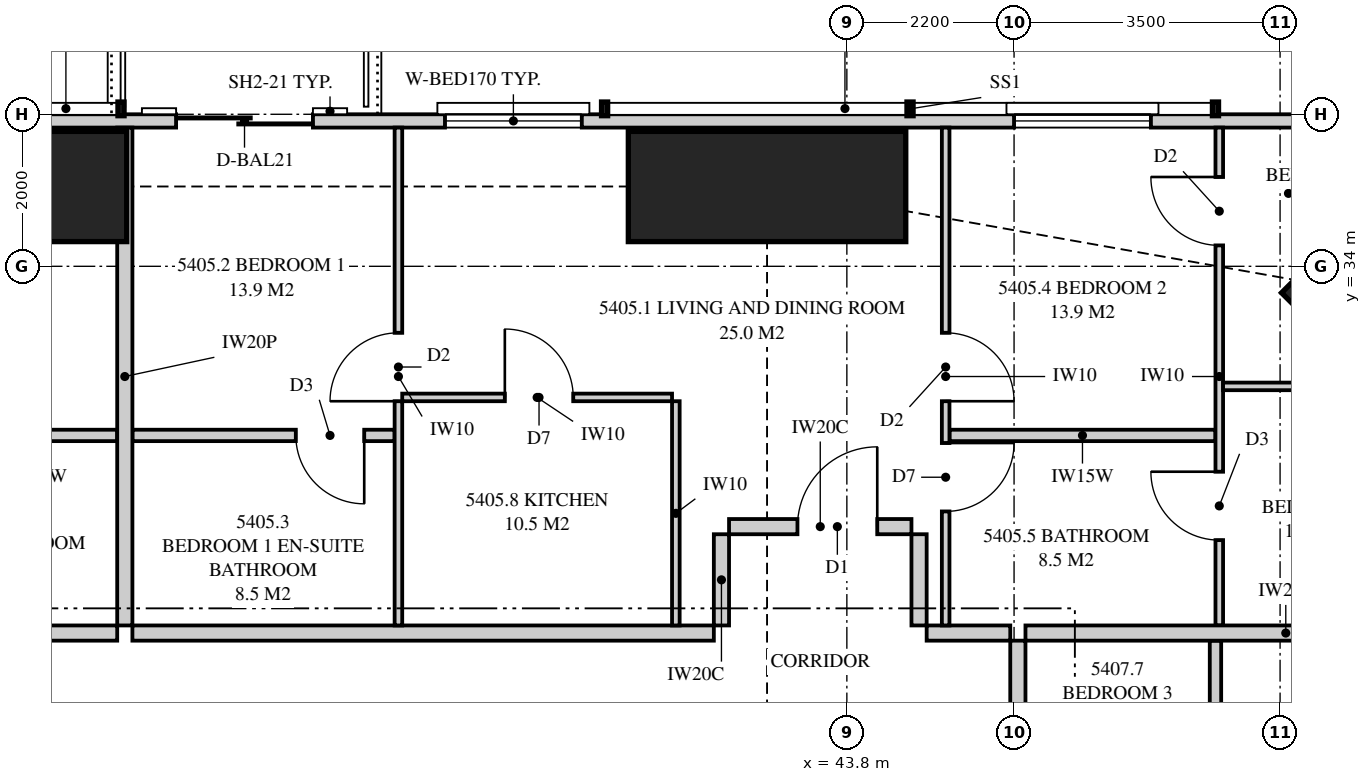
"""IFC4 building model, lengths in metres.
Left out: names, types, materials, properties, quantities, classifications, styles, units other than length and angle.
Written with IfcOpenShell. Run it as: python <this file> out.ifc"""

import sys

from ifc_helpers import new_model, si_unit, direction, frame, frame_2d, origin, origin_2d, place, context, subcontext, project, spatial, polyline, rectangle, outline, extrude, element, fill, save


model = new_model("IFC4")
c1 = context("Model", 3, precision=1e-05, world=origin(), true_north=direction((0.0, 1.0)))
c2 = subcontext(c1, "Body", "Model", "MODEL_VIEW")
j1 = project(units=[si_unit("LENGTHUNIT", "METRE"), si_unit("PLANEANGLEUNIT", "RADIAN")], contexts=[c1])
p1 = place(None, origin())
s1 = spatial("IfcSite", under=j1, at=p1, CompositionType="ELEMENT")
p2 = place(p1, origin())
s2 = spatial("IfcBuilding", under=s1, at=p2, CompositionType="ELEMENT")
p3 = place(p2, frame((0.0, 0.0, 197.9)))
s3 = spatial("IfcBuildingStorey", under=s2, at=p3, CompositionType="ELEMENT", Elevation=197.9)
p4 = place(p3, frame((50.652, 33.652, 0.0), z_axis=(0.0, 0.0, 1.0), x_axis=(0.707106781187, 0.707106781187, 0.0)))
e1 = element("IfcColumn", 1, at=p4, inside=s3, PredefinedType="COLUMN", context=c2, shape_type="SweptSolid", body=[
    extrude(rectangle(XDim=1.6, YDim=1.6, at=origin_2d()), origin(), (0.0, 0.0, 1.0), 3.35),
])
for number, where, z_axis, x_axis in (
    (2, (42.75, 35.05, 0.0), (0.0, 0.0, 1.0), (0.0, 1.0, 0.0)),
    (3, (32.5, 35.05, 0.0), (0.0, 0.0, 1.0), (0.0, 1.0, 0.0)),
):
    element("IfcColumn", number, at=place(p3, frame(where, z_axis=z_axis, x_axis=x_axis)), inside=s3, PredefinedType="COLUMN", context=c2, shape_type="SweptSolid", body=[
        extrude(rectangle(XDim=1.45, YDim=3.65, at=origin_2d()), origin(), (0.0, 0.0, 1.0), 3.35),
    ])
p5 = place(p3, frame((49.949, 35.913, 0.0), z_axis=(0.0, 0.0, 1.0), x_axis=(-1.0, 0.0, 0.0)))
e4 = element("IfcWall", 4, at=p5, inside=s3, PredefinedType="SOLIDWALL", context=c2, shape_type="SweptSolid", body=[
    extrude(outline(polyline([(0.0, 0.0), (34.897, 0.0), (34.897, 3.11), (27.91, 3.11), (27.91, 2.15), (27.836, 2.15), (27.836, 3.11), (27.699, 3.11), (27.699, 2.15), (7.199, 2.15), (7.199, 3.11), (7.062, 3.11), (7.062, 2.15), (6.987, 2.15), (6.987, 3.11), (0.0, 3.11), (0.0, 0.0)])), frame((0.0, 0.087, 0.0), z_axis=(0.0, -1.0, 0.0), x_axis=(1.0, 0.0, 0.0)), (0.0, 0.0, 1.0), 0.175),
])
p6 = place(p5, frame((2.149, 0.0, 0.4)))
e5 = element("IfcOpeningElement", 5, at=p6, cuts=e4, PredefinedType="OPENING", context=c2, shape_type="SweptSolid", body=[
    extrude(rectangle(XDim=1.8, YDim=1.7, at=frame_2d((0.9, 0.85))), frame((0.0, 0.097, 0.0), z_axis=(0.0, -1.0, 0.0), x_axis=(1.0, 0.0, 0.0)), (0.0, 0.0, 1.0), 0.195),
])
p7 = place(p5, frame((9.636, 0.0, 0.4)))
e6 = element("IfcOpeningElement", 6, at=p7, cuts=e4, PredefinedType="OPENING", context=c2, shape_type="SweptSolid", body=[
    extrude(rectangle(XDim=1.8, YDim=1.7, at=frame_2d((0.9, 0.85))), frame((0.0, 0.097, 0.0), z_axis=(0.0, -1.0, 0.0), x_axis=(1.0, 0.0, 0.0)), (0.0, 0.0, 1.0), 0.195),
])
p8 = place(p5, frame((13.174, 0.0, 0.0)))
e7 = element("IfcOpeningElement", 7, at=p8, cuts=e4, PredefinedType="OPENING", context=c2, shape_type="SweptSolid", body=[
    extrude(rectangle(XDim=1.8, YDim=2.1, at=frame_2d((0.9, 1.05))), frame((0.0, 0.097, 0.0), z_axis=(0.0, -1.0, 0.0), x_axis=(1.0, 0.0, 0.0)), (0.0, 0.0, 1.0), 0.195),
])
p9 = place(p5, frame((19.374, 0.0, 0.4)))
e8 = element("IfcOpeningElement", 8, at=p9, cuts=e4, PredefinedType="OPENING", context=c2, shape_type="SweptSolid", body=[
    extrude(rectangle(XDim=1.8, YDim=1.7, at=frame_2d((0.9, 0.85))), frame((0.0, 0.097, 0.0), z_axis=(0.0, -1.0, 0.0), x_axis=(1.0, 0.0, 0.0)), (0.0, 0.0, 1.0), 0.195),
])
p10 = place(p5, frame((23.224, 0.0, 0.4)))
e9 = element("IfcOpeningElement", 9, at=p10, cuts=e4, PredefinedType="OPENING", context=c2, shape_type="SweptSolid", body=[
    extrude(rectangle(XDim=2.4, YDim=1.7, at=frame_2d((1.2, 0.85))), frame((0.0, 0.097, 0.0), z_axis=(0.0, -1.0, 0.0), x_axis=(1.0, 0.0, 0.0)), (0.0, 0.0, 1.0), 0.195),
])
p11 = place(p5, frame((32.399, 0.0, 0.4)))
e10 = element("IfcOpeningElement", 10, at=p11, cuts=e4, PredefinedType="OPENING", context=c2, shape_type="SweptSolid", body=[
    extrude(rectangle(XDim=1.8, YDim=1.7, at=frame_2d((0.9, 0.85))), frame((0.0, 0.097, 0.0), z_axis=(0.0, -1.0, 0.0), x_axis=(1.0, 0.0, 0.0)), (0.0, 0.0, 1.0), 0.195),
])
p12 = place(p3, frame((34.3, 35.825, 0.0), z_axis=(0.0, 0.0, 1.0), x_axis=(0.0, -1.0, 0.0)))
e11 = element("IfcWall", 11, at=p12, inside=s3, PredefinedType="PARTITIONING", context=c2, shape_type="SweptSolid", body=[
    extrude(outline(polyline([(0.0, 0.0), (6.55, 0.0), (6.55, 3.11), (1.685, 3.11), (1.685, 2.15), (0.0, 2.15), (0.0, 3.11), (0.0, 0.0)])), frame((0.0, 0.1, 0.0), z_axis=(0.0, -1.0, 0.0), x_axis=(1.0, 0.0, 0.0)), (0.0, 0.0, 1.0), 0.2),
])
p13 = place(p3, frame((28.4, 31.775, 0.0), z_axis=(0.0, 0.0, 1.0), x_axis=(1.0, 0.0, 0.0)))
e12 = element("IfcWall", 12, at=p13, inside=s3, PredefinedType="PLUMBINGWALL", context=c2, shape_type="SweptSolid", body=[
    extrude(outline(polyline([(0.0, 0.0), (5.8, 0.0), (5.8, 3.11), (4.412, 3.11), (4.412, 2.541), (3.788, 2.541), (3.788, 3.11), (0.0, 3.11), (0.0, 0.0)])), frame((0.0, 0.075, 0.0), z_axis=(0.0, -1.0, 0.0), x_axis=(1.0, 0.0, 0.0)), (0.0, 0.0, 1.0), 0.15),
])
p14 = place(p13, frame((0.4, 0.0, 0.0)))
e13 = element("IfcOpeningElement", 13, at=p14, cuts=e12, PredefinedType="OPENING", context=c2, shape_type="SweptSolid", body=[
    extrude(rectangle(XDim=0.9, YDim=2.1, at=frame_2d((0.45, 1.05))), frame((0.0, 0.085, 0.0), z_axis=(0.0, -1.0, 0.0), x_axis=(1.0, 0.0, 0.0)), (0.0, 0.0, 1.0), 0.17),
])
p15 = place(p3, frame((34.4, 29.175, 0.0), z_axis=(0.0, 0.0, 1.0), x_axis=(1.0, 0.0, 0.0)))
e14 = element("IfcWall", 14, at=p15, inside=s3, PredefinedType="PARTITIONING", context=c2, shape_type="SweptSolid", body=[
    extrude(rectangle(XDim=7.65, YDim=0.2, at=frame_2d((3.825, 0.0))), origin(), (0.0, 0.0, 1.0), 3.11),
])
p16 = place(p3, frame((37.9, 35.825, 0.0), z_axis=(0.0, 0.0, 1.0), x_axis=(0.0, -1.0, 0.0)))
e15 = element("IfcWall", 15, at=p16, inside=s3, PredefinedType="PARTITIONING", context=c2, shape_type="SweptSolid", body=[
    extrude(outline(polyline([(0.0, 0.0), (6.55, 0.0), (6.55, 3.11), (1.635, 3.11), (1.635, 2.15), (0.0, 2.15), (0.0, 3.11), (0.0, 0.0)])), frame((0.0, 0.05, 0.0), z_axis=(0.0, -1.0, 0.0), x_axis=(1.0, 0.0, 0.0)), (0.0, 0.0, 1.0), 0.1),
])
p17 = place(p16, frame((2.7, 0.0, 0.0)))
e16 = element("IfcOpeningElement", 16, at=p17, cuts=e15, PredefinedType="OPENING", context=c2, shape_type="SweptSolid", body=[
    extrude(rectangle(XDim=0.9, YDim=2.1, at=frame_2d((0.45, 1.05))), frame((0.0, 0.06, 0.0), z_axis=(0.0, -1.0, 0.0), x_axis=(1.0, 0.0, 0.0)), (0.0, 0.0, 1.0), 0.12),
])
p18 = place(p3, frame((45.1, 35.825, 0.0), z_axis=(0.0, 0.0, 1.0), x_axis=(0.0, -1.0, 0.0)))
e17 = element("IfcWall", 17, at=p18, inside=s3, PredefinedType="PARTITIONING", context=c2, shape_type="SweptSolid", body=[
    extrude(outline(polyline([(0.0, 0.0), (6.55, 0.0), (6.55, 3.11), (2.064, 3.11), (2.064, 2.15), (0.318, 2.15), (0.318, 3.11), (0.0, 3.11), (0.0, 0.0)])), frame((0.0, 0.05, 0.0), z_axis=(0.0, -1.0, 0.0), x_axis=(1.0, 0.0, 0.0)), (0.0, 0.0, 1.0), 0.1),
])
p19 = place(p18, frame((2.7, 0.0, 0.0)))
e18 = element("IfcOpeningElement", 18, at=p19, cuts=e17, PredefinedType="OPENING", context=c2, shape_type="SweptSolid", body=[
    extrude(rectangle(XDim=0.9, YDim=2.1, at=frame_2d((0.45, 1.05))), frame((0.0, 0.06, 0.0), z_axis=(0.0, -1.0, 0.0), x_axis=(1.0, 0.0, 0.0)), (0.0, 0.0, 1.0), 0.12),
])
p20 = place(p18, frame((4.15, 0.0, 0.0)))
e19 = element("IfcOpeningElement", 19, at=p20, cuts=e17, PredefinedType="OPENING", context=c2, shape_type="SweptSolid", body=[
    extrude(rectangle(XDim=0.9, YDim=2.1, at=frame_2d((0.45, 1.05))), frame((0.0, 0.06, 0.0), z_axis=(0.0, -1.0, 0.0), x_axis=(1.0, 0.0, 0.0)), (0.0, 0.0, 1.0), 0.12),
])
p21 = place(p3, frame((48.7, 35.825, 0.0), z_axis=(0.0, 0.0, 1.0), x_axis=(0.0, -1.0, 0.0)))
e20 = element("IfcWall", 20, at=p21, inside=s3, PredefinedType="PARTITIONING", context=c2, shape_type="SweptSolid", body=[
    extrude(outline(polyline([(0.0, 0.0), (6.55, 0.0), (6.55, 3.11), (2.701, 3.11), (2.701, 2.15), (0.955, 2.15), (0.955, 3.11), (0.0, 3.11), (0.0, 0.0)])), frame((0.0, 0.05, 0.0), z_axis=(0.0, -1.0, 0.0), x_axis=(1.0, 0.0, 0.0)), (0.0, 0.0, 1.0), 0.1),
])
p22 = place(p21, frame((0.65, 0.0, 0.0)))
e21 = element("IfcOpeningElement", 21, at=p22, cuts=e20, PredefinedType="OPENING", context=c2, shape_type="SweptSolid", body=[
    extrude(rectangle(XDim=0.9, YDim=2.1, at=frame_2d((0.45, 1.05))), frame((0.0, 0.06, 0.0), z_axis=(0.0, -1.0, 0.0), x_axis=(1.0, 0.0, 0.0)), (0.0, 0.0, 1.0), 0.12),
])
p23 = place(p21, frame((4.527, 0.0, 0.0)))
e22 = element("IfcOpeningElement", 22, at=p23, cuts=e20, PredefinedType="OPENING", context=c2, shape_type="SweptSolid", body=[
    extrude(rectangle(XDim=0.9, YDim=2.1, at=frame_2d((0.45, 1.05))), frame((0.0, 0.06, 0.0), z_axis=(0.0, -1.0, 0.0), x_axis=(1.0, 0.0, 0.0)), (0.0, 0.0, 1.0), 0.12),
])
p24 = place(p3, frame((34.4, 31.775, 0.0), z_axis=(0.0, 0.0, 1.0), x_axis=(1.0, 0.0, 0.0)))
e23 = element("IfcWall", 23, at=p24, inside=s3, PredefinedType="PLUMBINGWALL", context=c2, shape_type="SweptSolid", body=[
    extrude(rectangle(XDim=3.45, YDim=0.15, at=frame_2d((1.725, 0.0))), origin(), (0.0, 0.0, 1.0), 3.11),
])
p25 = place(p24, frame((2.15, 0.0, 0.0)))
e24 = element("IfcOpeningElement", 24, at=p25, cuts=e23, PredefinedType="OPENING", context=c2, shape_type="SweptSolid", body=[
    extrude(rectangle(XDim=0.9, YDim=2.1, at=frame_2d((0.45, 1.05))), frame((0.0, 0.085, 0.0), z_axis=(0.0, -1.0, 0.0), x_axis=(1.0, 0.0, 0.0)), (0.0, 0.0, 1.0), 0.17),
])
p26 = place(p3, frame((45.15, 31.775, 0.0), z_axis=(0.0, 0.0, 1.0), x_axis=(1.0, 0.0, 0.0)))
e25 = element("IfcWall", 25, at=p26, inside=s3, PredefinedType="PLUMBINGWALL", context=c2, shape_type="SweptSolid", body=[
    extrude(rectangle(XDim=3.5, YDim=0.15, at=frame_2d((1.75, 0.0))), origin(), (0.0, 0.0, 1.0), 3.11),
])
p27 = place(p3, frame((48.75, 32.42, 0.0), z_axis=(0.0, 0.0, 1.0), x_axis=(1.0, 0.0, 0.0)))
e26 = element("IfcWall", 26, at=p27, inside=s3, PredefinedType="PARTITIONING", context=c2, shape_type="SweptSolid", body=[
    extrude(outline(polyline([(0.0, 0.0), (4.25, 0.0), (4.25, 3.11), (2.972, 3.11), (2.972, 2.15), (1.229, 2.15), (1.229, 3.11), (0.0, 3.11), (0.0, 0.0)])), frame((0.0, 0.05, 0.0), z_axis=(0.0, -1.0, 0.0), x_axis=(1.0, 0.0, 0.0)), (0.0, 0.0, 1.0), 0.1),
])
p28 = place(p27, frame((2.9, 0.0, 0.0)))
e27 = element("IfcOpeningElement", 27, at=p28, cuts=e26, PredefinedType="OPENING", context=c2, shape_type="SweptSolid", body=[
    extrude(rectangle(XDim=0.9, YDim=2.1, at=frame_2d((0.45, 1.05))), frame((0.0, 0.06, 0.0), z_axis=(0.0, -1.0, 0.0), x_axis=(1.0, 0.0, 0.0)), (0.0, 0.0, 1.0), 0.12),
])
p29 = place(p3, frame((37.95, 32.275, 0.0), z_axis=(0.0, 0.0, 1.0), x_axis=(1.0, 0.0, 0.0)))
e28 = element("IfcWall", 28, at=p29, inside=s3, PredefinedType="PARTITIONING", context=c2, shape_type="SweptSolid", body=[
    extrude(rectangle(XDim=3.55, YDim=0.1, at=frame_2d((1.775, 0.0))), origin(), (0.0, 0.0, 1.0), 3.11),
])
p30 = place(p29, frame((1.35, 0.0, 0.0)))
e29 = element("IfcOpeningElement", 29, at=p30, cuts=e28, PredefinedType="OPENING", context=c2, shape_type="SweptSolid", body=[
    extrude(rectangle(XDim=0.9, YDim=2.1, at=frame_2d((0.45, 1.05))), frame((0.0, 0.06, 0.0), z_axis=(0.0, -1.0, 0.0), x_axis=(1.0, 0.0, 0.0)), (0.0, 0.0, 1.0), 0.12),
])
p31 = place(p3, frame((41.55, 32.225, 0.0), z_axis=(0.0, 0.0, 1.0), x_axis=(0.0, -1.0, 0.0)))
e30 = element("IfcWall", 30, at=p31, inside=s3, PredefinedType="PARTITIONING", context=c2, shape_type="SweptSolid", body=[
    extrude(rectangle(XDim=2.95, YDim=0.1, at=frame_2d((1.475, 0.0))), origin(), (0.0, 0.0, 1.0), 3.11),
])
p32 = place(p3, frame((46.15, 29.175, 0.0), z_axis=(0.0, 0.0, 1.0), x_axis=(1.0, 0.0, 0.0)))
e31 = element("IfcWall", 31, at=p32, inside=s3, PredefinedType="PARTITIONING", context=c2, shape_type="SweptSolid", body=[
    extrude(outline(polyline([(0.0, 0.0), (6.85, 0.0), (6.85, 3.11), (6.147, 3.11), (6.147, 2.15), (4.303, 2.15), (4.303, 3.11), (0.0, 3.11), (0.0, 0.0)])), frame((0.0, 0.1, 0.0), z_axis=(0.0, -1.0, 0.0), x_axis=(1.0, 0.0, 0.0)), (0.0, 0.0, 1.0), 0.2),
])
p33 = place(p3, frame((46.05, 7.925, 0.0), z_axis=(0.0, 0.0, 1.0), x_axis=(0.0, 1.0, 0.0)))
e32 = element("IfcWall", 32, at=p33, inside=s3, PredefinedType="PARTITIONING", context=c2, shape_type="SweptSolid", body=[
    extrude(outline(polyline([(0.0, 0.0), (21.15, 0.0), (21.15, 3.11), (17.412, 3.11), (17.412, 2.541), (16.738, 2.541), (16.738, 3.11), (5.412, 3.11), (5.412, 2.541), (4.738, 2.541), (4.738, 3.11), (0.0, 3.11), (0.0, 0.0)])), frame((0.0, 0.1, 0.0), z_axis=(0.0, -1.0, 0.0), x_axis=(1.0, 0.0, 0.0)), (0.0, 0.0, 1.0), 0.2),
])
p34 = place(p33, frame((10.075, 0.0, 0.0)))
e33 = element("IfcOpeningElement", 33, at=p34, cuts=e32, PredefinedType="OPENING", context=c2, shape_type="SweptSolid", body=[
    extrude(rectangle(XDim=1.05, YDim=2.2, at=frame_2d((0.525, 1.1))), frame((0.0, 0.11, 0.0), z_axis=(0.0, -1.0, 0.0), x_axis=(1.0, 0.0, 0.0)), (0.0, 0.0, 1.0), 0.22),
])
p35 = place(p3, frame((48.65, 25.875, 0.0), z_axis=(0.0, 0.0, 1.0), x_axis=(0.0, 1.0, 0.0)))
e34 = element("IfcWall", 34, at=p35, inside=s3, PredefinedType="PLUMBINGWALL", context=c2, shape_type="SweptSolid", body=[
    extrude(rectangle(XDim=3.2, YDim=0.15, at=frame_2d((1.6, 0.0))), origin(), (0.0, 0.0, 1.0), 3.11),
])
p36 = place(p35, frame((0.4, 0.0, 0.0)))
e35 = element("IfcOpeningElement", 35, at=p36, cuts=e34, PredefinedType="OPENING", context=c2, shape_type="SweptSolid", body=[
    extrude(rectangle(XDim=0.9, YDim=2.1, at=frame_2d((0.45, 1.05))), frame((0.0, 0.085, 0.0), z_axis=(0.0, -1.0, 0.0), x_axis=(1.0, 0.0, 0.0)), (0.0, 0.0, 1.0), 0.17),
])
p37 = place(p3, frame((24.55, 29.175, 0.0), z_axis=(0.0, 0.0, 1.0), x_axis=(1.0, 0.0, 0.0)))
e36 = element("IfcWall", 36, at=p37, inside=s3, PredefinedType="PARTITIONING", context=c2, shape_type="SweptSolid", body=[
    extrude(outline(polyline([(0.0, 0.0), (9.65, 0.0), (9.65, 3.11), (8.287, 3.11), (8.287, 2.541), (7.613, 2.541), (7.613, 3.11), (0.0, 3.11), (0.0, 0.0)])), frame((0.0, 0.1, 0.0), z_axis=(0.0, -1.0, 0.0), x_axis=(1.0, 0.0, 0.0)), (0.0, 0.0, 1.0), 0.2),
])
p38 = place(p3, frame((44.85, 29.175, 0.0), z_axis=(0.0, 0.0, 1.0), x_axis=(1.0, 0.0, 0.0)))
e37 = element("IfcWall", 37, at=p38, inside=s3, PredefinedType="PARTITIONING", context=c2, shape_type="SweptSolid", body=[
    extrude(rectangle(XDim=1.1, YDim=0.2, at=frame_2d((0.55, 0.0))), origin(), (0.0, 0.0, 1.0), 3.11),
])
p39 = place(p3, frame((42.25, 30.575, 0.0), z_axis=(0.0, 0.0, 1.0), x_axis=(1.0, 0.0, 0.0)))
e38 = element("IfcWall", 38, at=p39, inside=s3, PredefinedType="PARTITIONING", context=c2, shape_type="SweptSolid", body=[
    extrude(outline(polyline([(0.0, 0.0), (2.4, 0.0), (2.4, 3.11), (0.837, 3.11), (0.837, 2.541), (0.163, 2.541), (0.163, 3.11), (0.0, 3.11), (0.0, 0.0)])), frame((0.0, 0.1, 0.0), z_axis=(0.0, -1.0, 0.0), x_axis=(1.0, 0.0, 0.0)), (0.0, 0.0, 1.0), 0.2),
])
p40 = place(p39, frame((0.9, 0.0, 0.0)))
e39 = element("IfcOpeningElement", 39, at=p40, cuts=e38, PredefinedType="OPENING", context=c2, shape_type="SweptSolid", body=[
    extrude(rectangle(XDim=1.05, YDim=2.2, at=frame_2d((0.525, 1.1))), frame((0.0, 0.11, 0.0), z_axis=(0.0, -1.0, 0.0), x_axis=(1.0, 0.0, 0.0)), (0.0, 0.0, 1.0), 0.22),
])
for number, where, z_axis, x_axis in (
    (40, (42.15, 29.275, 0.0), (0.0, 0.0, 1.0), (0.0, 1.0, 0.0)),
    (41, (44.75, 29.275, 0.0), (0.0, 0.0, 1.0), (0.0, 1.0, 0.0)),
):
    element("IfcWall", number, at=place(p3, frame(where, z_axis=z_axis, x_axis=x_axis)), inside=s3, PredefinedType="PARTITIONING", context=c2, shape_type="SweptSolid", body=[
        extrude(rectangle(XDim=1.2, YDim=0.2, at=frame_2d((0.6, 0.0))), origin(), (0.0, 0.0, 1.0), 3.11),
    ])
p41 = place(p6, origin())
e42 = element("IfcWindow", 42, at=p41, inside=s3, PartitioningType="SINGLE_PANEL", PredefinedType="WINDOW", context=c2, shape_type="SweptSolid", body=[
    extrude(rectangle(XDim=1.8, YDim=1.7, at=frame_2d((0.9, 0.85))), frame((0.0, 0.03, 0.0), z_axis=(0.0, -1.0, 0.0), x_axis=(1.0, 0.0, 0.0)), (0.0, 0.0, 1.0), 0.06),
])
fill(e5, e42)
p42 = place(p7, origin())
e43 = element("IfcWindow", 43, at=p42, inside=s3, PartitioningType="SINGLE_PANEL", PredefinedType="WINDOW", context=c2, shape_type="SweptSolid", body=[
    extrude(rectangle(XDim=1.8, YDim=1.7, at=frame_2d((0.9, 0.85))), frame((0.0, 0.03, 0.0), z_axis=(0.0, -1.0, 0.0), x_axis=(1.0, 0.0, 0.0)), (0.0, 0.0, 1.0), 0.06),
])
fill(e6, e43)
p43 = place(p8, origin())
e44 = element("IfcDoor", 44, at=p43, inside=s3, OperationType="SLIDING_TO_LEFT", PredefinedType="DOOR", context=c2, shape_type="SweptSolid", body=[
    extrude(rectangle(XDim=1.8, YDim=2.1, at=frame_2d((0.9, 1.05))), frame((0.0, 0.025, 0.0), z_axis=(0.0, -1.0, 0.0), x_axis=(1.0, 0.0, 0.0)), (0.0, 0.0, 1.0), 0.05),
])
fill(e7, e44)
p44 = place(p40, origin())
e45 = element("IfcDoor", 45, at=p44, inside=s3, OperationType="SINGLE_SWING_RIGHT", PredefinedType="DOOR", context=c2, shape_type="SweptSolid", body=[
    extrude(rectangle(XDim=1.05, YDim=2.2, at=frame_2d((0.525, 1.1))), frame((0.0, 0.025, 0.0), z_axis=(0.0, -1.0, 0.0), x_axis=(1.0, 0.0, 0.0)), (0.0, 0.0, 1.0), 0.05),
])
fill(e39, e45)
p45 = place(p17, frame((0.9, 0.0, 0.0), z_axis=(0.0, 0.0, 1.0), x_axis=(-1.0, 0.0, 0.0)))
e46 = element("IfcDoor", 46, at=p45, inside=s3, OperationType="SINGLE_SWING_LEFT", PredefinedType="DOOR", context=c2, shape_type="SweptSolid", body=[
    extrude(rectangle(XDim=0.9, YDim=2.1, at=frame_2d((0.45, 1.05))), frame((0.0, 0.025, 0.0), z_axis=(0.0, -1.0, 0.0), x_axis=(1.0, 0.0, 0.0)), (0.0, 0.0, 1.0), 0.05),
])
fill(e16, e46)
p46 = place(p25, frame((0.9, 0.0, 0.0), z_axis=(0.0, 0.0, 1.0), x_axis=(-1.0, 0.0, 0.0)))
e47 = element("IfcDoor", 47, at=p46, inside=s3, OperationType="SINGLE_SWING_LEFT", PredefinedType="DOOR", context=c2, shape_type="SweptSolid", body=[
    extrude(rectangle(XDim=0.9, YDim=2.1, at=frame_2d((0.45, 1.05))), frame((0.0, 0.025, 0.0), z_axis=(0.0, -1.0, 0.0), x_axis=(1.0, 0.0, 0.0)), (0.0, 0.0, 1.0), 0.05),
])
fill(e24, e47)
p47 = place(p19, origin())
e48 = element("IfcDoor", 48, at=p47, inside=s3, OperationType="SINGLE_SWING_RIGHT", PredefinedType="DOOR", context=c2, shape_type="SweptSolid", body=[
    extrude(rectangle(XDim=0.9, YDim=2.1, at=frame_2d((0.45, 1.05))), frame((0.0, 0.025, 0.0), z_axis=(0.0, -1.0, 0.0), x_axis=(1.0, 0.0, 0.0)), (0.0, 0.0, 1.0), 0.05),
])
fill(e18, e48)
p48 = place(p20, origin())
e49 = element("IfcDoor", 49, at=p48, inside=s3, OperationType="SINGLE_SWING_LEFT", PredefinedType="DOOR", context=c2, shape_type="SweptSolid", body=[
    extrude(rectangle(XDim=0.9, YDim=2.1, at=frame_2d((0.45, 1.05))), frame((0.0, 0.025, 0.0), z_axis=(0.0, -1.0, 0.0), x_axis=(1.0, 0.0, 0.0)), (0.0, 0.0, 1.0), 0.05),
])
fill(e19, e49)
p49 = place(p22, frame((0.9, 0.0, 0.0), z_axis=(0.0, 0.0, 1.0), x_axis=(-1.0, 0.0, 0.0)))
e50 = element("IfcDoor", 50, at=p49, inside=s3, OperationType="SINGLE_SWING_RIGHT", PredefinedType="DOOR", context=c2, shape_type="SweptSolid", body=[
    extrude(rectangle(XDim=0.9, YDim=2.1, at=frame_2d((0.45, 1.05))), frame((0.0, 0.025, 0.0), z_axis=(0.0, -1.0, 0.0), x_axis=(1.0, 0.0, 0.0)), (0.0, 0.0, 1.0), 0.05),
])
fill(e21, e50)
p50 = place(p23, frame((0.9, 0.0, 0.0), z_axis=(0.0, 0.0, 1.0), x_axis=(-1.0, 0.0, 0.0)))
e51 = element("IfcDoor", 51, at=p50, inside=s3, OperationType="SINGLE_SWING_RIGHT", PredefinedType="DOOR", context=c2, shape_type="SweptSolid", body=[
    extrude(rectangle(XDim=0.9, YDim=2.1, at=frame_2d((0.45, 1.05))), frame((0.0, 0.025, 0.0), z_axis=(0.0, -1.0, 0.0), x_axis=(1.0, 0.0, 0.0)), (0.0, 0.0, 1.0), 0.05),
])
fill(e22, e51)
p51 = place(p30, origin())
e52 = element("IfcDoor", 52, at=p51, inside=s3, OperationType="SINGLE_SWING_LEFT", PredefinedType="DOOR", context=c2, shape_type="SweptSolid", body=[
    extrude(rectangle(XDim=0.9, YDim=2.1, at=frame_2d((0.45, 1.05))), frame((0.0, 0.025, 0.0), z_axis=(0.0, -1.0, 0.0), x_axis=(1.0, 0.0, 0.0)), (0.0, 0.0, 1.0), 0.05),
])
fill(e29, e52)
save(model, sys.argv[1])
